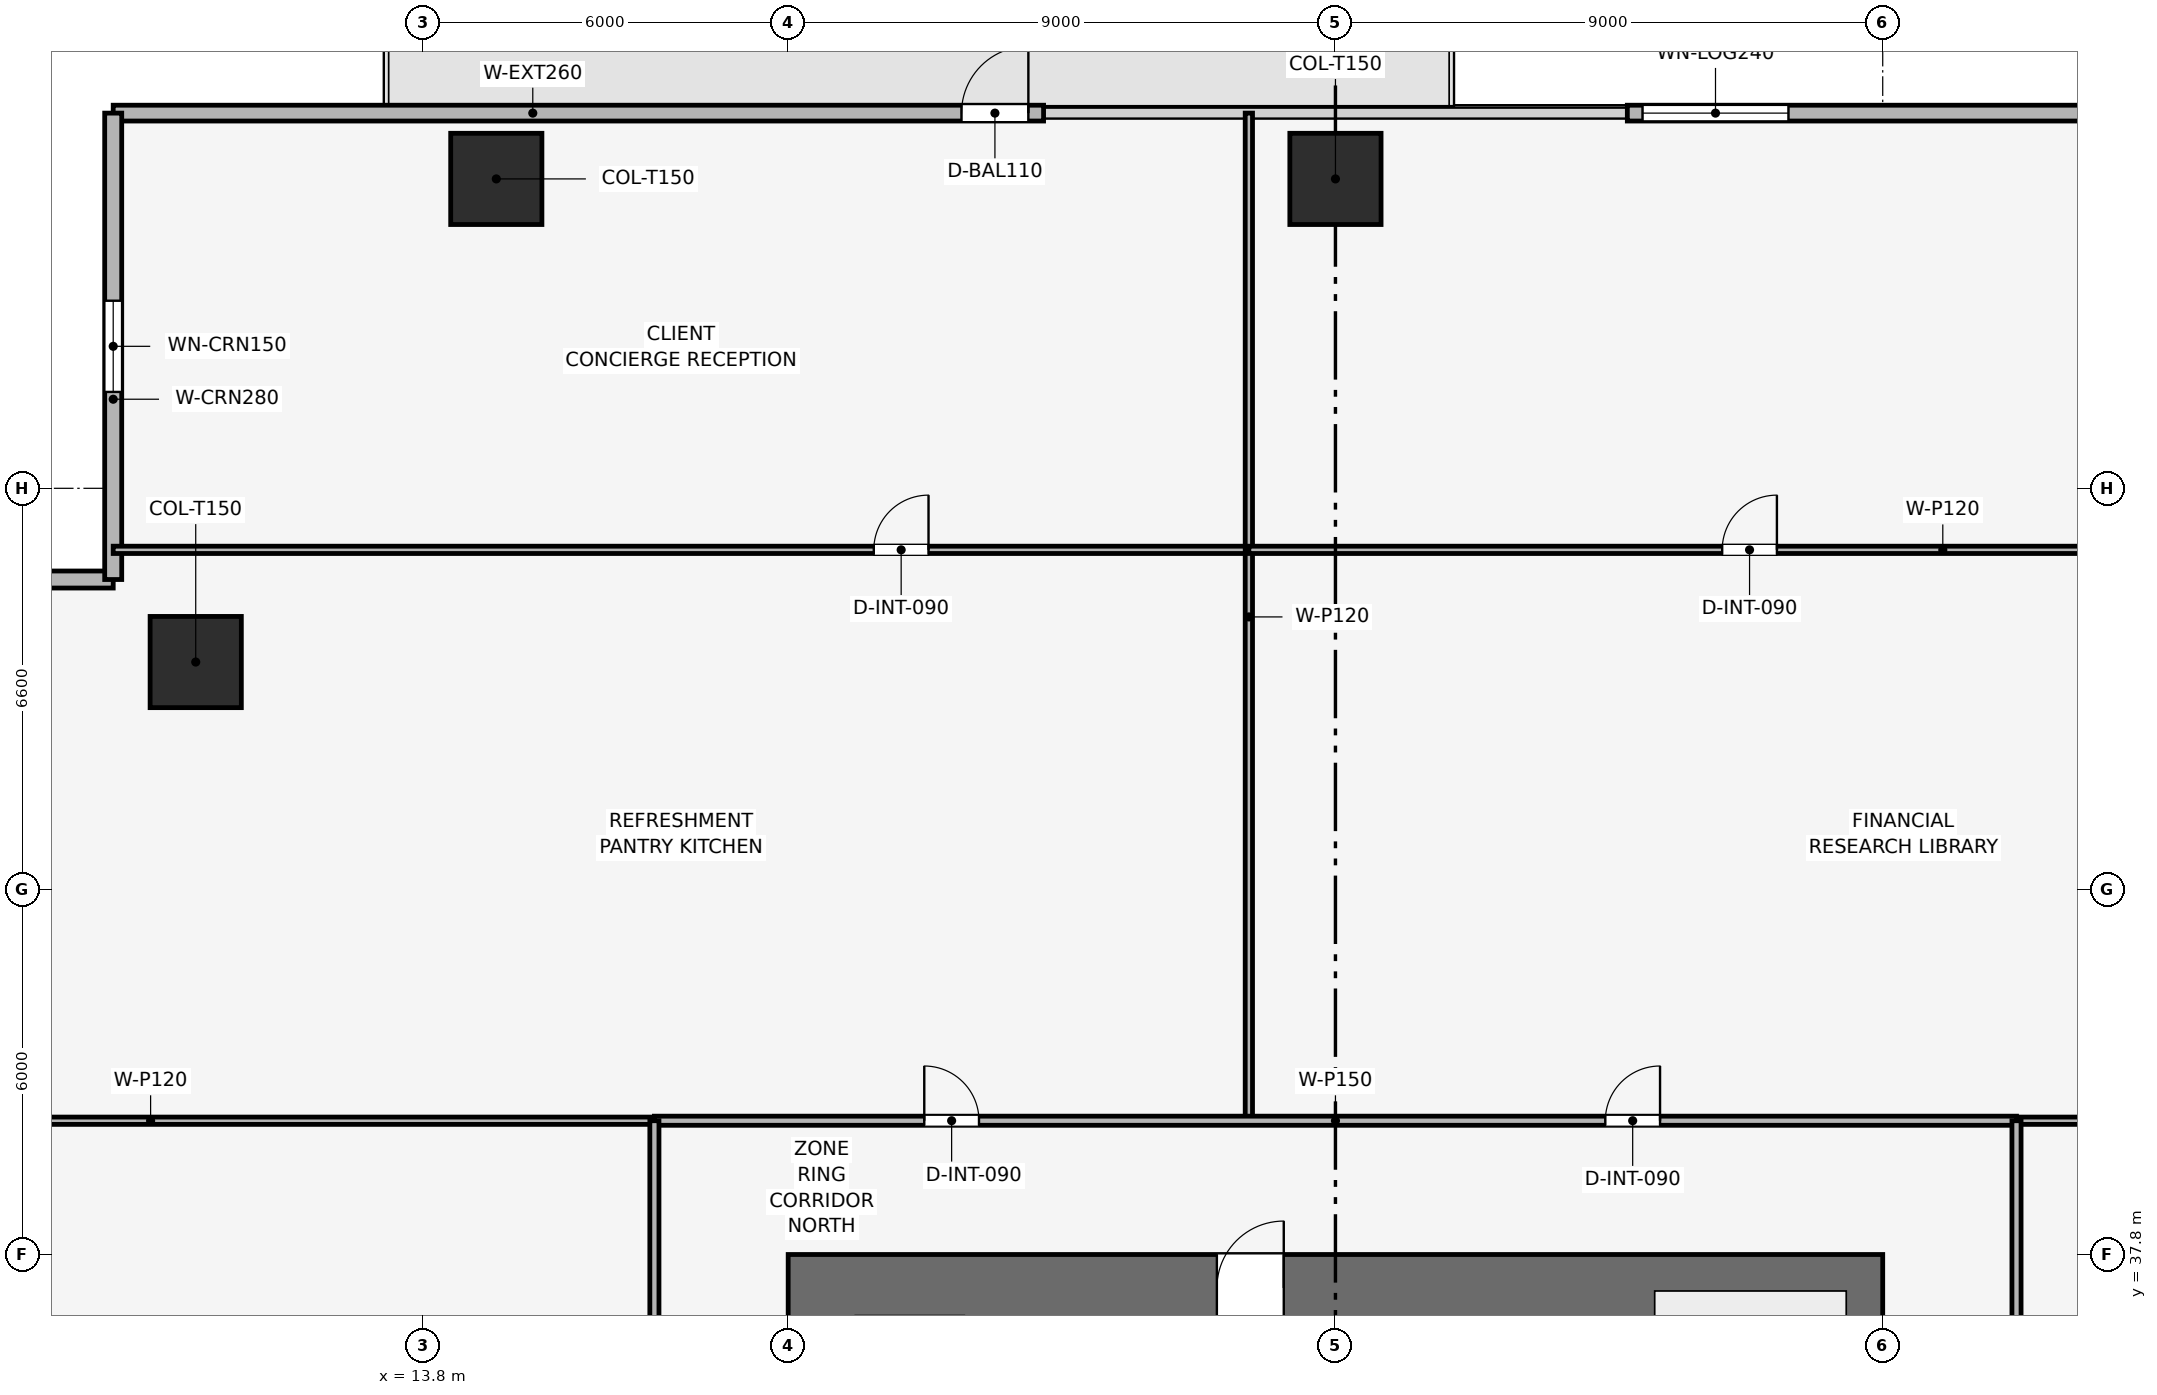
"""IFC4 building model, lengths in metres.
Left out: names, types, materials, properties, quantities, classifications, styles, units other than length and angle.
Written with IfcOpenShell. Run it as: python <this file> out.ifc"""

import sys

from ifc_helpers import new_model, si_unit, direction, frame, frame_2d, origin, origin_2d, place, context, subcontext, project, spatial, rectangle, extrude, element, fill, save


model = new_model("IFC4")
c1 = context("Model", 3, precision=1e-05, world=origin(), true_north=direction((0.0, 1.0)))
c2 = subcontext(c1, "Body", "Model", "MODEL_VIEW")
j1 = project(units=[si_unit("LENGTHUNIT", "METRE"), si_unit("PLANEANGLEUNIT", "RADIAN")], contexts=[c1])
p1 = place(None, origin())
s1 = spatial("IfcSite", under=j1, at=p1, CompositionType="ELEMENT")
p2 = place(p1, origin())
s2 = spatial("IfcBuilding", under=s1, at=p2, CompositionType="ELEMENT")
p3 = place(p2, frame((0.0, 0.0, 104.1)))
s3 = spatial("IfcBuildingStorey", under=s2, at=p3, CompositionType="ELEMENT", Elevation=104.1)
p4 = place(p3, frame((19.8, 37.25, 0.0), z_axis=(0.0, 0.0, 1.0), x_axis=(1.0, 0.0, 0.0)))
e1 = element("IfcWall", 1, at=p4, inside=s3, PredefinedType="SHEAR", context=c2, shape_type="SweptSolid", body=[
    extrude(rectangle(XDim=18.0, YDim=1.1, at=frame_2d((9.0, 0.0))), origin(), (0.0, 0.0, 1.0), 3.9),
])
p5 = place(p4, frame((7.05, 0.0, 0.0)))
e2 = element("IfcOpeningElement", 2, at=p5, cuts=e1, PredefinedType="OPENING", context=c2, shape_type="SweptSolid", body=[
    extrude(rectangle(XDim=1.1, YDim=2.15, at=frame_2d((0.55, 1.075))), frame((0.0, 0.56, 0.0), z_axis=(0.0, -1.0, 0.0), x_axis=(1.0, 0.0, 0.0)), (0.0, 0.0, 1.0), 1.12),
])
for number, where, z_axis, x_axis in (
    (3, (28.8, 55.488, 0.053), (0.0, -0.225, 0.974), (1.0, 0.0, 0.0)),
    (4, (15.0, 55.488, 0.053), (0.0, -0.225, 0.974), (1.0, 0.0, 0.0)),
):
    element("IfcColumn", number, at=place(p3, frame(where, z_axis=z_axis, x_axis=x_axis)), inside=s3, PredefinedType="COLUMN", context=c2, shape_type="SweptSolid", body=[
        extrude(rectangle(XDim=1.5, YDim=1.5, at=origin_2d()), origin(), (0.0, 0.0, 1.0), 3.575),
    ])
p6 = place(p3, frame((10.057, 47.543, 0.044), z_axis=(0.150260517648, -0.150192217413, 0.977171466358), x_axis=(0.706946020301, 0.707267505531, 0.0)))
e5 = element("IfcColumn", 5, at=p6, inside=s3, PredefinedType="COLUMN", context=c2, shape_type="SweptSolid", body=[
    extrude(rectangle(XDim=1.5, YDim=1.5, at=origin_2d()), origin(), (0.0, 0.0, 1.0), 3.574),
])
p7 = place(p3, frame((8.7, 56.57, 0.0), z_axis=(0.0, 0.0, 1.0), x_axis=(1.0, 0.0, 0.0)))
e6 = element("IfcWall", 6, at=p7, inside=s3, PredefinedType="SOLIDWALL", context=c2, shape_type="SweptSolid", body=[
    extrude(rectangle(XDim=15.3, YDim=0.26, at=frame_2d((7.65, 0.0))), origin(), (0.0, 0.0, 1.0), 3.54),
])
p8 = place(p7, frame((13.95, 0.0, 0.0)))
e7 = element("IfcOpeningElement", 7, at=p8, cuts=e6, PredefinedType="OPENING", context=c2, shape_type="SweptSolid", body=[
    extrude(rectangle(XDim=1.1, YDim=2.2, at=frame_2d((0.55, 1.1))), frame((0.0, 0.14, 0.0), z_axis=(0.0, -1.0, 0.0), x_axis=(1.0, 0.0, 0.0)), (0.0, 0.0, 1.0), 0.28),
])
p9 = place(p3, frame((33.6, 56.57, 0.0), z_axis=(0.0, 0.0, 1.0), x_axis=(1.0, 0.0, 0.0)))
e8 = element("IfcWall", 8, at=p9, inside=s3, PredefinedType="SOLIDWALL", context=c2, shape_type="SweptSolid", body=[
    extrude(rectangle(XDim=15.3, YDim=0.26, at=frame_2d((7.65, 0.0))), origin(), (0.0, 0.0, 1.0), 3.54),
])
p10 = place(p9, frame((0.25, 0.0, 0.72)))
e9 = element("IfcOpeningElement", 9, at=p10, cuts=e8, PredefinedType="OPENING", context=c2, shape_type="SweptSolid", body=[
    extrude(rectangle(XDim=2.4, YDim=2.1, at=frame_2d((1.2, 1.05))), frame((0.0, 0.14, 0.0), z_axis=(0.0, -1.0, 0.0), x_axis=(1.0, 0.0, 0.0)), (0.0, 0.0, 1.0), 0.28),
])
p11 = place(p3, frame((1.03, 48.9, 0.0), z_axis=(0.0, 0.0, 1.0), x_axis=(1.0, 0.0, 0.0)))
e10 = element("IfcWall", 10, at=p11, inside=s3, PredefinedType="SOLIDWALL", context=c2, shape_type="SweptSolid", body=[
    extrude(rectangle(XDim=7.67, YDim=0.28, at=frame_2d((3.835, 0.0))), origin(), (0.0, 0.0, 1.0), 3.54),
])
p12 = place(p11, frame((3.085, 0.0, 0.72)))
e11 = element("IfcOpeningElement", 11, at=p12, cuts=e10, PredefinedType="OPENING", context=c2, shape_type="SweptSolid", body=[
    extrude(rectangle(XDim=1.5, YDim=2.2, at=frame_2d((0.75, 1.1))), frame((0.0, 0.15, 0.0), z_axis=(0.0, -1.0, 0.0), x_axis=(1.0, 0.0, 0.0)), (0.0, 0.0, 1.0), 0.3),
])
p13 = place(p3, frame((8.7, 48.9, 0.0), z_axis=(0.0, 0.0, 1.0), x_axis=(0.0, 1.0, 0.0)))
e12 = element("IfcWall", 12, at=p13, inside=s3, PredefinedType="SOLIDWALL", context=c2, shape_type="SweptSolid", body=[
    extrude(rectangle(XDim=7.67, YDim=0.28, at=frame_2d((3.835, 0.0))), origin(), (0.0, 0.0, 1.0), 3.54),
])
p14 = place(p13, frame((3.085, 0.0, 0.72)))
e13 = element("IfcOpeningElement", 13, at=p14, cuts=e12, PredefinedType="OPENING", context=c2, shape_type="SweptSolid", body=[
    extrude(rectangle(XDim=1.5, YDim=2.2, at=frame_2d((0.75, 1.1))), frame((0.0, 0.15, 0.0), z_axis=(0.0, -1.0, 0.0), x_axis=(1.0, 0.0, 0.0)), (0.0, 0.0, 1.0), 0.3),
])
p15 = place(p3, frame((8.7, 49.388, 0.0), z_axis=(0.0, 0.0, 1.0), x_axis=(1.0, 0.0, 0.0)))
e14 = element("IfcWall", 14, at=p15, inside=s3, PredefinedType="PARTITIONING", context=c2, shape_type="SweptSolid", body=[
    extrude(rectangle(XDim=18.676, YDim=0.12, at=frame_2d((9.338, 0.0))), origin(), (0.0, 0.0, 1.0), 2.825),
])
p16 = place(p15, frame((12.508, 0.0, 0.0)))
e15 = element("IfcOpeningElement", 15, at=p16, cuts=e14, PredefinedType="OPENING", context=c2, shape_type="SweptSolid", body=[
    extrude(rectangle(XDim=0.9, YDim=2.1, at=frame_2d((0.45, 1.05))), frame((0.0, 0.07, 0.0), z_axis=(0.0, -1.0, 0.0), x_axis=(1.0, 0.0, 0.0)), (0.0, 0.0, 1.0), 0.14),
])
p17 = place(p3, frame((27.376, 40.0, 0.0), z_axis=(0.0, 0.0, 1.0), x_axis=(0.0, 1.0, 0.0)))
e16 = element("IfcWall", 16, at=p17, inside=s3, PredefinedType="PARTITIONING", context=c2, shape_type="SweptSolid", body=[
    extrude(rectangle(XDim=16.57, YDim=0.12, at=frame_2d((8.285, 0.0))), origin(), (0.0, 0.0, 1.0), 2.825),
])
p18 = place(p3, frame((27.376, 49.388, 0.0), z_axis=(0.0, 0.0, 1.0), x_axis=(1.0, 0.0, 0.0)))
e17 = element("IfcWall", 17, at=p18, inside=s3, PredefinedType="PARTITIONING", context=c2, shape_type="SweptSolid", body=[
    extrude(rectangle(XDim=21.524, YDim=0.12, at=frame_2d((10.762, 0.0))), origin(), (0.0, 0.0, 1.0), 2.825),
])
p19 = place(p18, frame((7.784, 0.0, 0.0)))
e18 = element("IfcOpeningElement", 18, at=p19, cuts=e17, PredefinedType="OPENING", context=c2, shape_type="SweptSolid", body=[
    extrude(rectangle(XDim=0.9, YDim=2.1, at=frame_2d((0.45, 1.05))), frame((0.0, 0.07, 0.0), z_axis=(0.0, -1.0, 0.0), x_axis=(1.0, 0.0, 0.0)), (0.0, 0.0, 1.0), 0.14),
])
for number, where, z_axis, x_axis in (
    (19, (1.03, 40.0, 0.0), (0.0, 0.0, 1.0), (1.0, 0.0, 0.0)),
    (20, (40.0, 40.0, 0.0), (0.0, 0.0, 1.0), (1.0, 0.0, 0.0)),
):
    element("IfcWall", number, at=place(p3, frame(where, z_axis=z_axis, x_axis=x_axis)), inside=s3, PredefinedType="PARTITIONING", context=c2, shape_type="SweptSolid", body=[
        extrude(rectangle(XDim=16.57, YDim=0.12, at=frame_2d((8.285, 0.0))), origin(), (0.0, 0.0, 1.0), 2.825),
    ])
p20 = place(p3, frame((17.6, 40.0, 0.0), z_axis=(0.0, 0.0, 1.0), x_axis=(1.0, 0.0, 0.0)))
e21 = element("IfcWall", 21, at=p20, inside=s3, PredefinedType="PARTITIONING", context=c2, shape_type="SweptSolid", body=[
    extrude(rectangle(XDim=22.4, YDim=0.15, at=frame_2d((11.2, 0.0))), origin(), (0.0, 0.0, 1.0), 2.975),
])
p21 = place(p20, frame((4.438, 0.0, 0.0)))
e22 = element("IfcOpeningElement", 22, at=p21, cuts=e21, PredefinedType="OPENING", context=c2, shape_type="SweptSolid", body=[
    extrude(rectangle(XDim=0.9, YDim=2.1, at=frame_2d((0.45, 1.05))), frame((0.0, 0.085, 0.0), z_axis=(0.0, -1.0, 0.0), x_axis=(1.0, 0.0, 0.0)), (0.0, 0.0, 1.0), 0.17),
])
p22 = place(p20, frame((15.638, 0.0, 0.0)))
e23 = element("IfcOpeningElement", 23, at=p22, cuts=e21, PredefinedType="OPENING", context=c2, shape_type="SweptSolid", body=[
    extrude(rectangle(XDim=0.9, YDim=2.1, at=frame_2d((0.45, 1.05))), frame((0.0, 0.085, 0.0), z_axis=(0.0, -1.0, 0.0), x_axis=(1.0, 0.0, 0.0)), (0.0, 0.0, 1.0), 0.17),
])
p23 = place(p3, frame((17.6, 17.6, 0.0), z_axis=(0.0, 0.0, 1.0), x_axis=(0.0, 1.0, 0.0)))
e24 = element("IfcWall", 24, at=p23, inside=s3, PredefinedType="PARTITIONING", context=c2, shape_type="SweptSolid", body=[
    extrude(rectangle(XDim=22.4, YDim=0.15, at=frame_2d((11.2, 0.0))), origin(), (0.0, 0.0, 1.0), 2.975),
])
p24 = place(p23, frame((1.4, 0.0, 0.0)))
e25 = element("IfcOpeningElement", 25, at=p24, cuts=e24, PredefinedType="OPENING", context=c2, shape_type="SweptSolid", body=[
    extrude(rectangle(XDim=0.9, YDim=2.1, at=frame_2d((0.45, 1.05))), frame((0.0, 0.085, 0.0), z_axis=(0.0, -1.0, 0.0), x_axis=(1.0, 0.0, 0.0)), (0.0, 0.0, 1.0), 0.17),
])
p25 = place(p23, frame((4.65, 0.0, 0.0)))
e26 = element("IfcOpeningElement", 26, at=p25, cuts=e24, PredefinedType="OPENING", context=c2, shape_type="SweptSolid", body=[
    extrude(rectangle(XDim=0.9, YDim=2.1, at=frame_2d((0.45, 1.05))), frame((0.0, 0.085, 0.0), z_axis=(0.0, -1.0, 0.0), x_axis=(1.0, 0.0, 0.0)), (0.0, 0.0, 1.0), 0.17),
])
p26 = place(p23, frame((7.55, 0.0, 0.0)))
e27 = element("IfcOpeningElement", 27, at=p26, cuts=e24, PredefinedType="OPENING", context=c2, shape_type="SweptSolid", body=[
    extrude(rectangle(XDim=0.9, YDim=2.1, at=frame_2d((0.45, 1.05))), frame((0.0, 0.085, 0.0), z_axis=(0.0, -1.0, 0.0), x_axis=(1.0, 0.0, 0.0)), (0.0, 0.0, 1.0), 0.17),
])
p27 = place(p23, frame((10.3, 0.0, 0.0)))
e28 = element("IfcOpeningElement", 28, at=p27, cuts=e24, PredefinedType="OPENING", context=c2, shape_type="SweptSolid", body=[
    extrude(rectangle(XDim=0.95, YDim=2.1, at=frame_2d((0.475, 1.05))), frame((0.0, 0.085, 0.0), z_axis=(0.0, -1.0, 0.0), x_axis=(1.0, 0.0, 0.0)), (0.0, 0.0, 1.0), 0.17),
])
p28 = place(p23, frame((16.8, 0.0, 0.0)))
e29 = element("IfcOpeningElement", 29, at=p28, cuts=e24, PredefinedType="OPENING", context=c2, shape_type="SweptSolid", body=[
    extrude(rectangle(XDim=0.9, YDim=2.1, at=frame_2d((0.45, 1.05))), frame((0.0, 0.085, 0.0), z_axis=(0.0, -1.0, 0.0), x_axis=(1.0, 0.0, 0.0)), (0.0, 0.0, 1.0), 0.17),
])
p29 = place(p3, frame((40.0, 17.6, 0.0), z_axis=(0.0, 0.0, 1.0), x_axis=(0.0, 1.0, 0.0)))
e30 = element("IfcWall", 30, at=p29, inside=s3, PredefinedType="PARTITIONING", context=c2, shape_type="SweptSolid", body=[
    extrude(rectangle(XDim=22.4, YDim=0.15, at=frame_2d((11.2, 0.0))), origin(), (0.0, 0.0, 1.0), 2.975),
])
p30 = place(p29, frame((0.7, 0.0, 0.0)))
e31 = element("IfcOpeningElement", 31, at=p30, cuts=e30, PredefinedType="OPENING", context=c2, shape_type="SweptSolid", body=[
    extrude(rectangle(XDim=0.9, YDim=2.1, at=frame_2d((0.45, 1.05))), frame((0.0, 0.085, 0.0), z_axis=(0.0, -1.0, 0.0), x_axis=(1.0, 0.0, 0.0)), (0.0, 0.0, 1.0), 0.17),
])
p31 = place(p29, frame((4.927, 0.0, 0.0)))
e32 = element("IfcOpeningElement", 32, at=p31, cuts=e30, PredefinedType="OPENING", context=c2, shape_type="SweptSolid", body=[
    extrude(rectangle(XDim=0.9, YDim=2.1, at=frame_2d((0.45, 1.05))), frame((0.0, 0.085, 0.0), z_axis=(0.0, -1.0, 0.0), x_axis=(1.0, 0.0, 0.0)), (0.0, 0.0, 1.0), 0.17),
])
p32 = place(p29, frame((10.886, 0.0, 0.0)))
e33 = element("IfcOpeningElement", 33, at=p32, cuts=e30, PredefinedType="OPENING", context=c2, shape_type="SweptSolid", body=[
    extrude(rectangle(XDim=0.9, YDim=2.1, at=frame_2d((0.45, 1.05))), frame((0.0, 0.085, 0.0), z_axis=(0.0, -1.0, 0.0), x_axis=(1.0, 0.0, 0.0)), (0.0, 0.0, 1.0), 0.17),
])
p33 = place(p29, frame((17.859, 0.0, 0.0)))
e34 = element("IfcOpeningElement", 34, at=p33, cuts=e30, PredefinedType="OPENING", context=c2, shape_type="SweptSolid", body=[
    extrude(rectangle(XDim=0.9, YDim=2.1, at=frame_2d((0.45, 1.05))), frame((0.0, 0.085, 0.0), z_axis=(0.0, -1.0, 0.0), x_axis=(1.0, 0.0, 0.0)), (0.0, 0.0, 1.0), 0.17),
])
p34 = place(p8, origin())
e35 = element("IfcDoor", 35, at=p34, inside=s3, OperationType="SINGLE_SWING_RIGHT", PredefinedType="DOOR", context=c2, shape_type="SweptSolid", body=[
    extrude(rectangle(XDim=1.1, YDim=2.2, at=frame_2d((0.55, 1.1))), frame((0.0, 0.025, 0.0), z_axis=(0.0, -1.0, 0.0), x_axis=(1.0, 0.0, 0.0)), (0.0, 0.0, 1.0), 0.05),
])
fill(e7, e35)
p35 = place(p10, origin())
e36 = element("IfcWindow", 36, at=p35, inside=s3, PartitioningType="SINGLE_PANEL", PredefinedType="WINDOW", context=c2, shape_type="SweptSolid", body=[
    extrude(rectangle(XDim=2.4, YDim=2.1, at=frame_2d((1.2, 1.05))), frame((0.0, 0.03, 0.0), z_axis=(0.0, -1.0, 0.0), x_axis=(1.0, 0.0, 0.0)), (0.0, 0.0, 1.0), 0.06),
])
fill(e9, e36)
p36 = place(p14, origin())
e37 = element("IfcWindow", 37, at=p36, inside=s3, PartitioningType="SINGLE_PANEL", PredefinedType="WINDOW", context=c2, shape_type="SweptSolid", body=[
    extrude(rectangle(XDim=1.5, YDim=2.2, at=frame_2d((0.75, 1.1))), frame((0.0, 0.03, 0.0), z_axis=(0.0, -1.0, 0.0), x_axis=(1.0, 0.0, 0.0)), (0.0, 0.0, 1.0), 0.06),
])
fill(e13, e37)
p37 = place(p16, origin())
e38 = element("IfcDoor", 38, at=p37, inside=s3, OperationType="SINGLE_SWING_RIGHT", PredefinedType="DOOR", context=c2, shape_type="SweptSolid", body=[
    extrude(rectangle(XDim=0.9, YDim=2.1, at=frame_2d((0.45, 1.05))), frame((0.0, 0.025, 0.0), z_axis=(0.0, -1.0, 0.0), x_axis=(1.0, 0.0, 0.0)), (0.0, 0.0, 1.0), 0.05),
])
fill(e15, e38)
p38 = place(p19, origin())
e39 = element("IfcDoor", 39, at=p38, inside=s3, OperationType="SINGLE_SWING_RIGHT", PredefinedType="DOOR", context=c2, shape_type="SweptSolid", body=[
    extrude(rectangle(XDim=0.9, YDim=2.1, at=frame_2d((0.45, 1.05))), frame((0.0, 0.025, 0.0), z_axis=(0.0, -1.0, 0.0), x_axis=(1.0, 0.0, 0.0)), (0.0, 0.0, 1.0), 0.05),
])
fill(e18, e39)
p39 = place(p21, origin())
e40 = element("IfcDoor", 40, at=p39, inside=s3, OperationType="SINGLE_SWING_LEFT", PredefinedType="DOOR", context=c2, shape_type="SweptSolid", body=[
    extrude(rectangle(XDim=0.9, YDim=2.1, at=frame_2d((0.45, 1.05))), frame((0.0, 0.025, 0.0), z_axis=(0.0, -1.0, 0.0), x_axis=(1.0, 0.0, 0.0)), (0.0, 0.0, 1.0), 0.05),
])
fill(e22, e40)
p40 = place(p22, origin())
e41 = element("IfcDoor", 41, at=p40, inside=s3, OperationType="SINGLE_SWING_RIGHT", PredefinedType="DOOR", context=c2, shape_type="SweptSolid", body=[
    extrude(rectangle(XDim=0.9, YDim=2.1, at=frame_2d((0.45, 1.05))), frame((0.0, 0.025, 0.0), z_axis=(0.0, -1.0, 0.0), x_axis=(1.0, 0.0, 0.0)), (0.0, 0.0, 1.0), 0.05),
])
fill(e23, e41)
p41 = place(p5, origin())
e42 = element("IfcDoor", 42, at=p41, inside=s3, OperationType="SINGLE_SWING_RIGHT", PredefinedType="DOOR", context=c2, shape_type="SweptSolid", body=[
    extrude(rectangle(XDim=1.1, YDim=2.15, at=frame_2d((0.55, 1.075))), frame((0.0, 0.025, 0.0), z_axis=(0.0, -1.0, 0.0), x_axis=(1.0, 0.0, 0.0)), (0.0, 0.0, 1.0), 0.05),
])
fill(e2, e42)
save(model, sys.argv[1])
